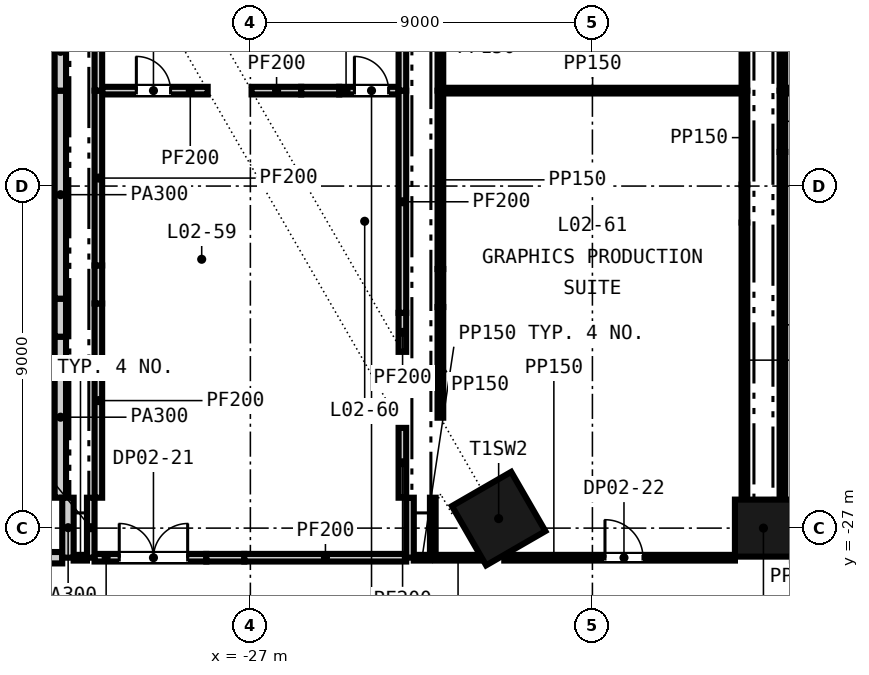
"""IFC4 building model, lengths in metres.
Left out: names, types, materials, properties, quantities, classifications, styles, units other than length and angle.
Written with IfcOpenShell. Run it as: python <this file> out.ifc"""

import sys

from ifc_helpers import new_model, si_unit, direction, frame, frame_2d, origin, origin_2d, place, context, subcontext, project, spatial, rectangle, extrude, element, fill, save


model = new_model("IFC4")
c1 = context("Model", 3, precision=1e-05, world=origin(), true_north=direction((0.0, 1.0)))
c2 = subcontext(c1, "Body", "Model", "MODEL_VIEW")
j1 = project(units=[si_unit("LENGTHUNIT", "METRE"), si_unit("PLANEANGLEUNIT", "RADIAN")], contexts=[c1])
p1 = place(None, origin())
s1 = spatial("IfcSite", under=j1, at=p1, CompositionType="ELEMENT")
p2 = place(p1, origin())
s2 = spatial("IfcBuilding", under=s1, at=p2, CompositionType="ELEMENT")
p3 = place(p2, frame((0.0, 0.0, 18.0)))
s3 = spatial("IfcBuildingStorey", under=s2, at=p3, CompositionType="ELEMENT", Elevation=18.0)
p4 = place(p3, frame((-20.467, -26.75, -0.4), z_axis=(0.0, 0.0, 1.0), x_axis=(0.5, -0.866025403784, 0.0)))
e1 = element("IfcColumn", 1, at=p4, inside=s3, PredefinedType="COLUMN", context=c2, shape_type="SweptSolid", body=[
    extrude(rectangle(XDim=1.8, YDim=1.8, at=origin_2d()), origin(), (0.0, 0.0, 1.0), 4.6),
])
p5 = place(p3, frame((-13.5, -27.0, -0.4), z_axis=(0.0, 0.0, 1.0), x_axis=(1.0, 0.0, 0.0)))
e2 = element("IfcColumn", 2, at=p5, inside=s3, PredefinedType="COLUMN", context=c2, shape_type="SweptSolid", body=[
    extrude(rectangle(XDim=1.5, YDim=1.5, at=origin_2d()), origin(), (0.0, 0.0, 1.0), 4.6),
])
p6 = place(p3, frame((-38.729, -27.779, 0.0), z_axis=(0.0, 0.0, 1.0), x_axis=(1.0, 0.0, 0.0)))
e3 = element("IfcWall", 3, at=p6, inside=s3, PredefinedType="PARTITIONING", context=c2, shape_type="SweptSolid", body=[
    extrude(rectangle(XDim=6.779, YDim=0.3, at=frame_2d((3.39, 0.0))), origin(), (0.0, 0.0, 1.0), 4.2),
])
p7 = place(p3, frame((-31.65, -27.779, 0.0), z_axis=(0.0, 0.0, 1.0), x_axis=(1.0, 0.0, 0.0)))
e4 = element("IfcWall", 4, at=p7, inside=s3, PredefinedType="PARTITIONING", context=c2, shape_type="SweptSolid", body=[
    extrude(rectangle(XDim=0.35, YDim=0.15, at=frame_2d((0.175, 0.0))), origin(), (0.0, 0.0, 1.0), 4.2),
])
p8 = place(p3, frame((-31.1, -27.779, 0.0), z_axis=(0.0, 0.0, 1.0), x_axis=(1.0, 0.0, 0.0)))
e5 = element("IfcWall", 5, at=p8, inside=s3, PredefinedType="PARTITIONING", context=c2, shape_type="SweptSolid", body=[
    extrude(rectangle(XDim=2.941, YDim=0.2, at=frame_2d((1.47, 0.0))), origin(), (0.0, 0.0, 1.0), 4.2),
])
p9 = place(p8, frame((0.65, 0.0, 0.0)))
e6 = element("IfcOpeningElement", 6, at=p9, cuts=e5, PredefinedType="OPENING", context=c2, shape_type="SweptSolid", body=[
    extrude(rectangle(XDim=1.8, YDim=2.4, at=frame_2d((0.9, 1.2))), frame((0.0, 0.11, 0.0), z_axis=(0.0, -1.0, 0.0), x_axis=(1.0, 0.0, 0.0)), (0.0, 0.0, 1.0), 0.22),
])
p10 = place(p3, frame((-28.159, -27.779, 0.0), z_axis=(0.0, 0.0, 1.0), x_axis=(1.0, 0.0, 0.0)))
e7 = element("IfcWall", 7, at=p10, inside=s3, PredefinedType="PARTITIONING", context=c2, shape_type="SweptSolid", body=[
    extrude(rectangle(XDim=1.0, YDim=0.2, at=frame_2d((0.5, 0.0))), origin(), (0.0, 0.0, 1.0), 3.219),
])
p11 = place(p3, frame((-27.159, -27.779, 0.0), z_axis=(0.0, 0.0, 1.0), x_axis=(1.0, 0.0, 0.0)))
e8 = element("IfcWall", 8, at=p11, inside=s3, PredefinedType="PARTITIONING", context=c2, shape_type="SweptSolid", body=[
    extrude(rectangle(XDim=4.259, YDim=0.2, at=frame_2d((2.13, 0.0))), origin(), (0.0, 0.0, 1.0), 4.2),
])
p12 = place(p3, frame((-22.7, -27.779, 0.0), z_axis=(0.0, 0.0, 1.0), x_axis=(1.0, 0.0, 0.0)))
e9 = element("IfcWall", 9, at=p12, inside=s3, PredefinedType="PARTITIONING", context=c2, shape_type="SweptSolid", body=[
    extrude(rectangle(XDim=0.425, YDim=0.15, at=frame_2d((0.212, 0.0))), origin(), (0.0, 0.0, 1.0), 4.2),
])
p13 = place(p3, frame((-22.125, -27.779, 0.0), z_axis=(0.0, 0.0, 1.0), x_axis=(1.0, 0.0, 0.0)))
e10 = element("IfcWall", 10, at=p13, inside=s3, PredefinedType="PARTITIONING", context=c2, shape_type="SweptSolid", body=[
    extrude(rectangle(XDim=1.169, YDim=0.15, at=frame_2d((0.585, 0.0))), origin(), (0.0, 0.0, 1.0), 4.2),
])
p14 = place(p3, frame((-20.319, -27.779, 0.0), z_axis=(0.0, 0.0, 1.0), x_axis=(1.0, 0.0, 0.0)))
e11 = element("IfcWall", 11, at=p14, inside=s3, PredefinedType="PARTITIONING", context=c2, shape_type="SweptSolid", body=[
    extrude(rectangle(XDim=6.069, YDim=0.15, at=frame_2d((3.035, 0.0))), origin(), (0.0, 0.0, 1.0), 4.2),
])
p15 = place(p14, frame((2.65, 0.0, 0.0)))
e12 = element("IfcOpeningElement", 12, at=p15, cuts=e11, PredefinedType="OPENING", context=c2, shape_type="SweptSolid", body=[
    extrude(rectangle(XDim=1.0, YDim=2.1, at=frame_2d((0.5, 1.05))), frame((0.0, 0.085, 0.0), z_axis=(0.0, -1.0, 0.0), x_axis=(1.0, 0.0, 0.0)), (0.0, 0.0, 1.0), 0.17),
])
p16 = place(p3, frame((-35.781, -15.489, 0.0), z_axis=(0.0, 0.0, 1.0), x_axis=(1.0, 0.0, 0.0)))
e13 = element("IfcWall", 13, at=p16, inside=s3, PredefinedType="PARTITIONING", context=c2, shape_type="SweptSolid", body=[
    extrude(rectangle(XDim=3.631, YDim=0.3, at=frame_2d((1.815, 0.0))), origin(), (0.0, 0.0, 1.0), 4.2),
])
p17 = place(p3, frame((-30.9, -15.489, 0.0), z_axis=(0.0, 0.0, 1.0), x_axis=(1.0, 0.0, 0.0)))
e14 = element("IfcWall", 14, at=p17, inside=s3, PredefinedType="PARTITIONING", context=c2, shape_type="SweptSolid", body=[
    extrude(rectangle(XDim=2.777, YDim=0.2, at=frame_2d((1.388, 0.0))), origin(), (0.0, 0.0, 1.0), 4.2),
])
p18 = place(p17, frame((0.9, 0.0, 0.0)))
e15 = element("IfcOpeningElement", 15, at=p18, cuts=e14, PredefinedType="OPENING", context=c2, shape_type="SweptSolid", body=[
    extrude(rectangle(XDim=0.9, YDim=2.1, at=frame_2d((0.45, 1.05))), frame((0.0, 0.11, 0.0), z_axis=(0.0, -1.0, 0.0), x_axis=(1.0, 0.0, 0.0)), (0.0, 0.0, 1.0), 0.22),
])
p19 = place(p3, frame((-26.968, -15.489, 0.0), z_axis=(0.0, 0.0, 1.0), x_axis=(1.0, 0.0, 0.0)))
e16 = element("IfcWall", 16, at=p19, inside=s3, PredefinedType="PARTITIONING", context=c2, shape_type="SweptSolid", body=[
    extrude(rectangle(XDim=1.306, YDim=0.2, at=frame_2d((0.653, 0.0))), origin(), (0.0, 0.0, 1.0), 4.2),
])
p20 = place(p3, frame((-25.662, -15.489, 0.0), z_axis=(0.0, 0.0, 1.0), x_axis=(1.0, 0.0, 0.0)))
e17 = element("IfcWall", 17, at=p20, inside=s3, PredefinedType="PARTITIONING", context=c2, shape_type="SweptSolid", body=[
    extrude(rectangle(XDim=1.0, YDim=0.2, at=frame_2d((0.5, 0.0))), origin(), (0.0, 0.0, 1.0), 3.597),
])
p21 = place(p3, frame((-24.662, -15.489, 0.0), z_axis=(0.0, 0.0, 1.0), x_axis=(1.0, 0.0, 0.0)))
e18 = element("IfcWall", 18, at=p21, inside=s3, PredefinedType="PARTITIONING", context=c2, shape_type="SweptSolid", body=[
    extrude(rectangle(XDim=1.562, YDim=0.2, at=frame_2d((0.781, 0.0))), origin(), (0.0, 0.0, 1.0), 3.111),
])
p22 = place(p21, frame((0.4, 0.0, 0.0)))
e19 = element("IfcOpeningElement", 19, at=p22, cuts=e18, PredefinedType="OPENING", context=c2, shape_type="SweptSolid", body=[
    extrude(rectangle(XDim=0.9, YDim=2.1, at=frame_2d((0.45, 1.05))), frame((0.0, 0.11, 0.0), z_axis=(0.0, -1.0, 0.0), x_axis=(1.0, 0.0, 0.0)), (0.0, 0.0, 1.0), 0.22),
])
p23 = place(p3, frame((-21.925, -15.489, 0.0), z_axis=(0.0, 0.0, 1.0), x_axis=(1.0, 0.0, 0.0)))
e20 = element("IfcWall", 20, at=p23, inside=s3, PredefinedType="PARTITIONING", context=c2, shape_type="SweptSolid", body=[
    extrude(rectangle(XDim=7.85, YDim=0.15, at=frame_2d((3.925, 0.0))), origin(), (0.0, 0.0, 1.0), 4.2),
])
p24 = place(p3, frame((-12.925, -15.489, 0.0), z_axis=(0.0, 0.0, 1.0), x_axis=(1.0, 0.0, 0.0)))
e21 = element("IfcWall", 21, at=p24, inside=s3, PredefinedType="PARTITIONING", context=c2, shape_type="SweptSolid", body=[
    extrude(rectangle(XDim=3.895, YDim=0.15, at=frame_2d((1.948, 0.0))), origin(), (0.0, 0.0, 1.0), 4.2),
])
p25 = place(p3, frame((-32.0, -26.2, 0.0), z_axis=(0.0, 0.0, 1.0), x_axis=(0.0, 1.0, 0.0)))
e22 = element("IfcWall", 22, at=p25, inside=s3, PredefinedType="PARTITIONING", context=c2, shape_type="SweptSolid", body=[
    extrude(rectangle(XDim=4.237, YDim=0.3, at=frame_2d((2.119, 0.0))), origin(), (0.0, 0.0, 1.0), 4.2),
])
p26 = place(p3, frame((-32.0, -21.963, 0.0), z_axis=(0.0, 0.0, 1.0), x_axis=(0.0, 1.0, 0.0)))
e23 = element("IfcWall", 23, at=p26, inside=s3, PredefinedType="PARTITIONING", context=c2, shape_type="SweptSolid", body=[
    extrude(rectangle(XDim=1.0, YDim=0.3, at=frame_2d((0.5, 0.0))), origin(), (0.0, 0.0, 1.0), 3.219),
])
p27 = place(p3, frame((-32.0, -20.963, 0.0), z_axis=(0.0, 0.0, 1.0), x_axis=(0.0, 1.0, 0.0)))
e24 = element("IfcWall", 24, at=p27, inside=s3, PredefinedType="PARTITIONING", context=c2, shape_type="SweptSolid", body=[
    extrude(rectangle(XDim=5.472, YDim=0.3, at=frame_2d((2.736, 0.0))), origin(), (0.0, 0.0, 1.0), 4.2),
])
p28 = place(p3, frame((-32.0, -15.489, 0.0), z_axis=(0.0, 0.0, 1.0), x_axis=(0.0, 1.0, 0.0)))
e25 = element("IfcWall", 25, at=p28, inside=s3, PredefinedType="PARTITIONING", context=c2, shape_type="SweptSolid", body=[
    extrude(rectangle(XDim=2.066, YDim=0.3, at=frame_2d((1.033, 0.0))), origin(), (0.0, 0.0, 1.0), 4.2),
])
p29 = place(p3, frame((-31.8, -27.778, 0.0), z_axis=(0.0, 0.0, 1.0), x_axis=(0.0, 1.0, 0.0)))
e26 = element("IfcWall", 26, at=p29, inside=s3, PredefinedType="PARTITIONING", context=c2, shape_type="SweptSolid", body=[
    extrude(rectangle(XDim=1.578, YDim=0.3, at=frame_2d((0.789, 0.0))), origin(), (0.0, 0.0, 1.0), 4.2),
])
p30 = place(p3, frame((-31.2, -27.778, 0.0), z_axis=(0.0, 0.0, 1.0), x_axis=(0.0, 1.0, 0.0)))
e27 = element("IfcWall", 27, at=p30, inside=s3, PredefinedType="PARTITIONING", context=c2, shape_type="SweptSolid", body=[
    extrude(rectangle(XDim=1.578, YDim=0.2, at=frame_2d((0.789, 0.0))), origin(), (0.0, 0.0, 1.0), 4.2),
])
p31 = place(p3, frame((-31.0, -26.2, 0.0), z_axis=(0.0, 0.0, 1.0), x_axis=(0.0, 1.0, 0.0)))
e28 = element("IfcWall", 28, at=p31, inside=s3, PredefinedType="PARTITIONING", context=c2, shape_type="SweptSolid", body=[
    extrude(rectangle(XDim=5.111, YDim=0.2, at=frame_2d((2.555, 0.0))), origin(), (0.0, 0.0, 1.0), 4.2),
])
p32 = place(p3, frame((-31.0, -21.089, 0.0), z_axis=(0.0, 0.0, 1.0), x_axis=(0.0, 1.0, 0.0)))
e29 = element("IfcWall", 29, at=p32, inside=s3, PredefinedType="PARTITIONING", context=c2, shape_type="SweptSolid", body=[
    extrude(rectangle(XDim=1.0, YDim=0.2, at=frame_2d((0.5, 0.0))), origin(), (0.0, 0.0, 1.0), 3.597),
])
p33 = place(p3, frame((-31.0, -20.089, 0.0), z_axis=(0.0, 0.0, 1.0), x_axis=(0.0, 1.0, 0.0)))
e30 = element("IfcWall", 30, at=p33, inside=s3, PredefinedType="PARTITIONING", context=c2, shape_type="SweptSolid", body=[
    extrude(rectangle(XDim=4.599, YDim=0.2, at=frame_2d((2.299, 0.0))), origin(), (0.0, 0.0, 1.0), 4.2),
])
p34 = place(p3, frame((-31.0, -15.489, 0.0), z_axis=(0.0, 0.0, 1.0), x_axis=(0.0, 1.0, 0.0)))
e31 = element("IfcWall", 31, at=p34, inside=s3, PredefinedType="PARTITIONING", context=c2, shape_type="SweptSolid", body=[
    extrude(rectangle(XDim=4.982, YDim=0.2, at=frame_2d((2.491, 0.0))), origin(), (0.0, 0.0, 1.0), 4.2),
])
p35 = place(p3, frame((-23.0, -26.2, 0.0), z_axis=(0.0, 0.0, 1.0), x_axis=(0.0, 1.0, 0.0)))
e32 = element("IfcWall", 32, at=p35, inside=s3, PredefinedType="PARTITIONING", context=c2, shape_type="SweptSolid", body=[
    extrude(rectangle(XDim=1.837, YDim=0.2, at=frame_2d((0.918, 0.0))), origin(), (0.0, 0.0, 1.0), 4.2),
])
p36 = place(p3, frame((-23.0, -22.363, 0.0), z_axis=(0.0, 0.0, 1.0), x_axis=(0.0, 1.0, 0.0)))
e33 = element("IfcWall", 33, at=p36, inside=s3, PredefinedType="PARTITIONING", context=c2, shape_type="SweptSolid", body=[
    extrude(rectangle(XDim=1.027, YDim=0.2, at=frame_2d((0.513, 0.0))), origin(), (0.0, 0.0, 1.0), 3.219),
])
p37 = place(p3, frame((-23.0, -21.336, 0.0), z_axis=(0.0, 0.0, 1.0), x_axis=(0.0, 1.0, 0.0)))
e34 = element("IfcWall", 34, at=p37, inside=s3, PredefinedType="PARTITIONING", context=c2, shape_type="SweptSolid", body=[
    extrude(rectangle(XDim=5.846, YDim=0.2, at=frame_2d((2.923, 0.0))), origin(), (0.0, 0.0, 1.0), 4.2),
])
p38 = place(p3, frame((-23.0, -15.489, 0.0), z_axis=(0.0, 0.0, 1.0), x_axis=(0.0, 1.0, 0.0)))
e35 = element("IfcWall", 35, at=p38, inside=s3, PredefinedType="PARTITIONING", context=c2, shape_type="SweptSolid", body=[
    extrude(rectangle(XDim=5.688, YDim=0.2, at=frame_2d((2.844, 0.0))), origin(), (0.0, 0.0, 1.0), 4.2),
])
p39 = place(p3, frame((-22.8, -27.778, 0.0), z_axis=(0.0, 0.0, 1.0), x_axis=(0.0, 1.0, 0.0)))
e36 = element("IfcWall", 36, at=p39, inside=s3, PredefinedType="PARTITIONING", context=c2, shape_type="SweptSolid", body=[
    extrude(rectangle(XDim=1.578, YDim=0.2, at=frame_2d((0.789, 0.0))), origin(), (0.0, 0.0, 1.0), 4.2),
])
p40 = place(p3, frame((-22.2, -27.778, 0.0), z_axis=(0.0, 0.0, 1.0), x_axis=(0.0, 1.0, 0.0)))
e37 = element("IfcWall", 37, at=p40, inside=s3, PredefinedType="PARTITIONING", context=c2, shape_type="SweptSolid", body=[
    extrude(rectangle(XDim=1.578, YDim=0.15, at=frame_2d((0.789, 0.0))), origin(), (0.0, 0.0, 1.0), 4.2),
])
p41 = place(p3, frame((-22.0, -24.095, 0.0), z_axis=(0.0, 0.0, 1.0), x_axis=(0.0, 1.0, 0.0)))
e38 = element("IfcWall", 38, at=p41, inside=s3, PredefinedType="PARTITIONING", context=c2, shape_type="SweptSolid", body=[
    extrude(rectangle(XDim=2.912, YDim=0.15, at=frame_2d((1.456, 0.0))), origin(), (0.0, 0.0, 1.0), 4.2),
])
p42 = place(p3, frame((-22.0, -21.183, 0.0), z_axis=(0.0, 0.0, 1.0), x_axis=(0.0, 1.0, 0.0)))
e39 = element("IfcWall", 39, at=p42, inside=s3, PredefinedType="PARTITIONING", context=c2, shape_type="SweptSolid", body=[
    extrude(rectangle(XDim=1.0, YDim=0.15, at=frame_2d((0.5, 0.0))), origin(), (0.0, 0.0, 1.0), 3.597),
])
p43 = place(p3, frame((-22.0, -20.183, 0.0), z_axis=(0.0, 0.0, 1.0), x_axis=(0.0, 1.0, 0.0)))
e40 = element("IfcWall", 40, at=p43, inside=s3, PredefinedType="PARTITIONING", context=c2, shape_type="SweptSolid", body=[
    extrude(rectangle(XDim=4.692, YDim=0.15, at=frame_2d((2.346, 0.0))), origin(), (0.0, 0.0, 1.0), 4.2),
])
p44 = place(p3, frame((-22.0, -15.489, 0.0), z_axis=(0.0, 0.0, 1.0), x_axis=(0.0, 1.0, 0.0)))
e41 = element("IfcWall", 41, at=p44, inside=s3, PredefinedType="PARTITIONING", context=c2, shape_type="SweptSolid", body=[
    extrude(rectangle(XDim=2.262, YDim=0.15, at=frame_2d((1.131, 0.0))), origin(), (0.0, 0.0, 1.0), 4.2),
])
p45 = place(p3, frame((-14.0, -26.2, 0.0), z_axis=(0.0, 0.0, 1.0), x_axis=(0.0, 1.0, 0.0)))
e42 = element("IfcWall", 42, at=p45, inside=s3, PredefinedType="PARTITIONING", context=c2, shape_type="SweptSolid", body=[
    extrude(rectangle(XDim=7.239, YDim=0.15, at=frame_2d((3.62, 0.0))), origin(), (0.0, 0.0, 1.0), 4.2),
])
p46 = place(p3, frame((-14.0, -18.961, 0.0), z_axis=(0.0, 0.0, 1.0), x_axis=(0.0, 1.0, 0.0)))
e43 = element("IfcWall", 43, at=p46, inside=s3, PredefinedType="PARTITIONING", context=c2, shape_type="SweptSolid", body=[
    extrude(rectangle(XDim=1.0, YDim=0.15, at=frame_2d((0.5, 0.0))), origin(), (0.0, 0.0, 1.0), 3.521),
])
p47 = place(p3, frame((-14.0, -17.961, 0.0), z_axis=(0.0, 0.0, 1.0), x_axis=(0.0, 1.0, 0.0)))
e44 = element("IfcWall", 44, at=p47, inside=s3, PredefinedType="PARTITIONING", context=c2, shape_type="SweptSolid", body=[
    extrude(rectangle(XDim=2.47, YDim=0.15, at=frame_2d((1.235, 0.0))), origin(), (0.0, 0.0, 1.0), 4.2),
])
p48 = place(p3, frame((-14.0, -15.489, 0.0), z_axis=(0.0, 0.0, 1.0), x_axis=(0.0, 1.0, 0.0)))
e45 = element("IfcWall", 45, at=p48, inside=s3, PredefinedType="PARTITIONING", context=c2, shape_type="SweptSolid", body=[
    extrude(rectangle(XDim=5.688, YDim=0.15, at=frame_2d((2.844, 0.0))), origin(), (0.0, 0.0, 1.0), 4.2),
])
p49 = place(p3, frame((-13.0, -26.2, 0.0), z_axis=(0.0, 0.0, 1.0), x_axis=(0.0, 1.0, 0.0)))
e46 = element("IfcWall", 46, at=p49, inside=s3, PredefinedType="PARTITIONING", context=c2, shape_type="SweptSolid", body=[
    extrude(rectangle(XDim=9.098, YDim=0.15, at=frame_2d((4.549, 0.0))), origin(), (0.0, 0.0, 1.0), 4.2),
])
p50 = place(p3, frame((-13.0, -17.102, 0.0), z_axis=(0.0, 0.0, 1.0), x_axis=(0.0, 1.0, 0.0)))
e47 = element("IfcWall", 47, at=p50, inside=s3, PredefinedType="PARTITIONING", context=c2, shape_type="SweptSolid", body=[
    extrude(rectangle(XDim=1.612, YDim=0.15, at=frame_2d((0.806, 0.0))), origin(), (0.0, 0.0, 1.0), 3.749),
])
p51 = place(p3, frame((-13.0, -15.489, 0.0), z_axis=(0.0, 0.0, 1.0), x_axis=(0.0, 1.0, 0.0)))
e48 = element("IfcWall", 48, at=p51, inside=s3, PredefinedType="PARTITIONING", context=c2, shape_type="SweptSolid", body=[
    extrude(rectangle(XDim=5.688, YDim=0.15, at=frame_2d((2.844, 0.0))), origin(), (0.0, 0.0, 1.0), 4.2),
])
p52 = place(p9, origin())
e49 = element("IfcDoor", 49, at=p52, inside=s3, OperationType="SINGLE_SWING_LEFT", PredefinedType="DOOR", context=c2, shape_type="SweptSolid", body=[
    extrude(rectangle(XDim=1.8, YDim=2.4, at=frame_2d((0.9, 1.2))), frame((0.0, 0.025, 0.0), z_axis=(0.0, -1.0, 0.0), x_axis=(1.0, 0.0, 0.0)), (0.0, 0.0, 1.0), 0.05),
])
fill(e6, e49)
p53 = place(p15, origin())
e50 = element("IfcDoor", 50, at=p53, inside=s3, OperationType="SINGLE_SWING_LEFT", PredefinedType="DOOR", context=c2, shape_type="SweptSolid", body=[
    extrude(rectangle(XDim=1.0, YDim=2.1, at=frame_2d((0.5, 1.05))), frame((0.0, 0.025, 0.0), z_axis=(0.0, -1.0, 0.0), x_axis=(1.0, 0.0, 0.0)), (0.0, 0.0, 1.0), 0.05),
])
fill(e12, e50)
p54 = place(p18, origin())
e51 = element("IfcDoor", 51, at=p54, inside=s3, OperationType="SINGLE_SWING_LEFT", PredefinedType="DOOR", context=c2, shape_type="SweptSolid", body=[
    extrude(rectangle(XDim=0.9, YDim=2.1, at=frame_2d((0.45, 1.05))), frame((0.0, 0.025, 0.0), z_axis=(0.0, -1.0, 0.0), x_axis=(1.0, 0.0, 0.0)), (0.0, 0.0, 1.0), 0.05),
])
fill(e15, e51)
p55 = place(p22, origin())
e52 = element("IfcDoor", 52, at=p55, inside=s3, OperationType="SINGLE_SWING_LEFT", PredefinedType="DOOR", context=c2, shape_type="SweptSolid", body=[
    extrude(rectangle(XDim=0.9, YDim=2.1, at=frame_2d((0.45, 1.05))), frame((0.0, 0.025, 0.0), z_axis=(0.0, -1.0, 0.0), x_axis=(1.0, 0.0, 0.0)), (0.0, 0.0, 1.0), 0.05),
])
fill(e19, e52)
save(model, sys.argv[1])
